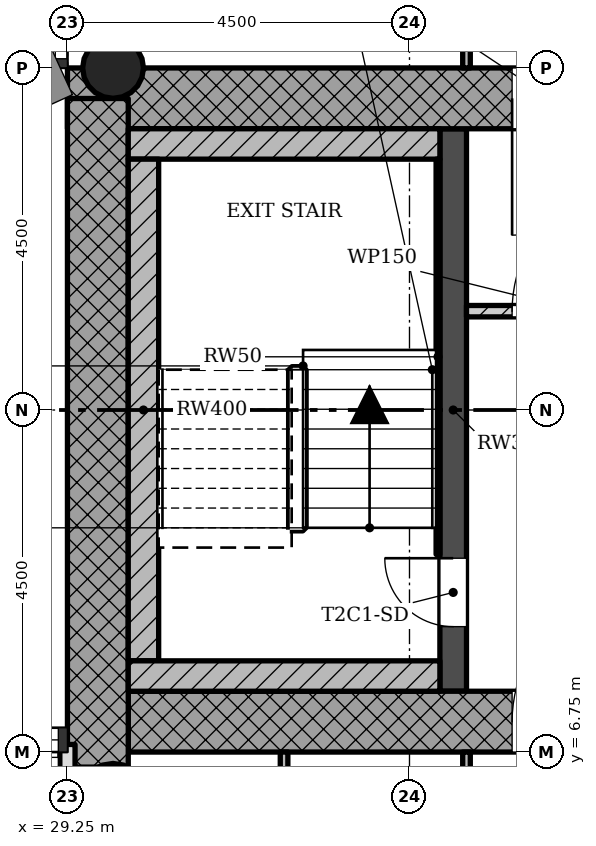
"""IFC4 building model, lengths in metres.
Left out: names, types, materials, properties, quantities, classifications, styles, units other than length and angle.
Written with IfcOpenShell. Run it as: python <this file> out.ifc"""

import sys

from ifc_helpers import new_model, si_unit, direction, frame, frame_2d, origin, origin_2d, place, context, subcontext, project, spatial, rectangle, hollow_circle, extrude, element, fill, save


model = new_model("IFC4")
c1 = context("Model", 3, precision=1e-05, world=origin(), true_north=direction((0.0, 1.0)))
c2 = subcontext(c1, "Body", "Model", "MODEL_VIEW")
j1 = project(units=[si_unit("LENGTHUNIT", "METRE"), si_unit("PLANEANGLEUNIT", "RADIAN")], contexts=[c1])
p1 = place(None, origin())
s1 = spatial("IfcSite", under=j1, at=p1, CompositionType="ELEMENT")
p2 = place(p1, origin())
s2 = spatial("IfcBuilding", under=s1, at=p2, CompositionType="ELEMENT")
p3 = place(p2, frame((0.0, 0.0, 157.5)))
s3 = spatial("IfcBuildingStorey", under=s2, at=p3, CompositionType="ELEMENT", Elevation=157.5)
p4 = place(p3, frame((30.05, 7.15, 0.0), z_axis=(0.0, 0.0, 1.0), x_axis=(1.0, 0.0, 0.0)))
e1 = element("IfcWall", 1, at=p4, inside=s3, PredefinedType="SHEAR", context=c2, shape_type="SweptSolid", body=[
    extrude(rectangle(XDim=12.7, YDim=0.8, at=frame_2d((6.35, 0.0))), origin(), (0.0, 0.0, 1.0), 3.4),
])
p5 = place(p4, frame((5.05, 0.0, 0.0)))
e2 = element("IfcOpeningElement", 2, at=p5, cuts=e1, PredefinedType="OPENING", context=c2, shape_type="SweptSolid", body=[
    extrude(rectangle(XDim=1.8, YDim=2.1, at=frame_2d((0.9, 1.05))), frame((0.0, 0.41, 0.0), z_axis=(0.0, -1.0, 0.0), x_axis=(1.0, 0.0, 0.0)), (0.0, 0.0, 1.0), 0.82),
])
p6 = place(p3, frame((41.95, 15.35, 0.0), z_axis=(0.0, 0.0, 1.0), x_axis=(-1.0, 0.0, 0.0)))
e3 = element("IfcWall", 3, at=p6, inside=s3, PredefinedType="SHEAR", context=c2, shape_type="SweptSolid", body=[
    extrude(rectangle(XDim=12.7, YDim=0.8, at=frame_2d((6.35, 0.0))), origin(), (0.0, 0.0, 1.0), 3.4),
])
p7 = place(p6, frame((5.05, 0.0, 0.0)))
e4 = element("IfcOpeningElement", 4, at=p7, cuts=e3, PredefinedType="OPENING", context=c2, shape_type="SweptSolid", body=[
    extrude(rectangle(XDim=1.8, YDim=2.1, at=frame_2d((0.9, 1.05))), frame((0.0, 0.41, 0.0), z_axis=(0.0, -1.0, 0.0), x_axis=(1.0, 0.0, 0.0)), (0.0, 0.0, 1.0), 0.82),
])
p8 = place(p3, frame((29.65, 15.348, 0.0), z_axis=(0.0, 0.0, 1.0), x_axis=(0.0, -1.0, 0.0)))
e5 = element("IfcWall", 5, at=p8, inside=s3, PredefinedType="SHEAR", context=c2, shape_type="SweptSolid", body=[
    extrude(rectangle(XDim=8.796, YDim=0.8, at=frame_2d((4.398, 0.0))), origin(), (0.0, 0.0, 1.0), 3.4),
])
p9 = place(p3, frame((34.325, 7.55, 0.0), z_axis=(0.0, 0.0, 1.0), x_axis=(0.0, 1.0, 0.0)))
e6 = element("IfcWall", 6, at=p9, inside=s3, PredefinedType="SHEAR", context=c2, shape_type="SweptSolid", body=[
    extrude(rectangle(XDim=7.4, YDim=0.35, at=frame_2d((3.7, 0.0))), origin(), (0.0, 0.0, 1.0), 3.4),
])
p10 = place(p9, frame((0.85, 0.0, 0.0)))
e7 = element("IfcOpeningElement", 7, at=p10, cuts=e6, PredefinedType="OPENING", context=c2, shape_type="SweptSolid", body=[
    extrude(rectangle(XDim=0.9, YDim=2.1, at=frame_2d((0.45, 1.05))), frame((0.0, 0.185, 0.0), z_axis=(0.0, -1.0, 0.0), x_axis=(1.0, 0.0, 0.0)), (0.0, 0.0, 1.0), 0.37),
])
p11 = place(p3, frame((29.85, 15.75, 0.0), z_axis=(0.0, 0.0, 1.0), x_axis=(1.0, 0.0, 0.0)))
e8 = element("IfcColumn", 8, at=p11, inside=s3, PredefinedType="COLUMN", context=c2, shape_type="SweptSolid", body=[
    extrude(hollow_circle(Radius=0.4, WallThickness=0.028, at=origin_2d()), origin(), (0.0, 0.0, 1.0), 3.4),
])
p12 = place(p3, frame((29.85, 6.15, 0.0), z_axis=(0.0, 0.0, 1.0), x_axis=(1.0, 0.0, 0.0)))
e9 = element("IfcColumn", 9, at=p12, inside=s3, PredefinedType="COLUMN", context=c2, shape_type="SweptSolid", body=[
    extrude(hollow_circle(Radius=0.45, WallThickness=0.032, at=origin_2d()), origin(), (0.0, 0.0, 1.0), 3.4),
])
p13 = place(p3, frame((37.5, 12.55, 0.0), z_axis=(0.0, 0.0, 1.0), x_axis=(-1.0, 0.0, 0.0)))
e10 = element("IfcWall", 10, at=p13, inside=s3, PredefinedType="PARTITIONING", context=c2, shape_type="SweptSolid", body=[
    extrude(rectangle(XDim=3.0, YDim=0.15, at=frame_2d((1.5, 0.0))), origin(), (0.0, 0.0, 1.0), 3.0),
])
p14 = place(p13, frame((0.6, 0.0, 0.0)))
e11 = element("IfcOpeningElement", 11, at=p14, cuts=e10, PredefinedType="OPENING", context=c2, shape_type="SweptSolid", body=[
    extrude(rectangle(XDim=1.8, YDim=2.1, at=frame_2d((0.9, 1.05))), frame((0.0, 0.085, 0.0), z_axis=(0.0, -1.0, 0.0), x_axis=(1.0, 0.0, 0.0)), (0.0, 0.0, 1.0), 0.17),
])
p15 = place(p3, frame((34.5, 4.5, 0.0), z_axis=(0.0, 0.0, 1.0), x_axis=(0.0, 1.0, 0.0)))
e12 = element("IfcWall", 12, at=p15, inside=s3, PredefinedType="PARTITIONING", context=c2, shape_type="SweptSolid", body=[
    extrude(rectangle(XDim=2.25, YDim=0.1, at=frame_2d((1.125, 0.0))), origin(), (0.0, 0.0, 1.0), 3.0),
])
p16 = place(p15, frame((0.675, 0.0, 0.0)))
e13 = element("IfcOpeningElement", 13, at=p16, cuts=e12, PredefinedType="OPENING", context=c2, shape_type="SweptSolid", body=[
    extrude(rectangle(XDim=0.9, YDim=2.1, at=frame_2d((0.45, 1.05))), frame((0.0, 0.06, 0.0), z_axis=(0.0, -1.0, 0.0), x_axis=(1.0, 0.0, 0.0)), (0.0, 0.0, 1.0), 0.12),
])
p17 = place(p3, frame((34.5, 15.75, 0.0), z_axis=(0.0, 0.0, 1.0), x_axis=(0.0, 1.0, 0.0)))
e14 = element("IfcWall", 14, at=p17, inside=s3, PredefinedType="PARTITIONING", context=c2, shape_type="SweptSolid", body=[
    extrude(rectangle(XDim=4.5, YDim=0.1, at=frame_2d((2.25, 0.0))), origin(), (0.0, 0.0, 1.0), 3.0),
])
p18 = place(p17, frame((1.8, 0.0, 0.0)))
e15 = element("IfcOpeningElement", 15, at=p18, cuts=e14, PredefinedType="OPENING", context=c2, shape_type="SweptSolid", body=[
    extrude(rectangle(XDim=0.9, YDim=2.1, at=frame_2d((0.45, 1.05))), frame((0.0, 0.06, 0.0), z_axis=(0.0, -1.0, 0.0), x_axis=(1.0, 0.0, 0.0)), (0.0, 0.0, 1.0), 0.12),
])
p19 = place(p3, frame((32.1, 4.5, 0.0), z_axis=(0.0, 0.0, 1.0), x_axis=(0.0, 1.0, 0.0)))
e16 = element("IfcWall", 16, at=p19, inside=s3, PredefinedType="PARTITIONING", context=c2, shape_type="SweptSolid", body=[
    extrude(rectangle(XDim=2.25, YDim=0.1, at=frame_2d((1.125, 0.0))), origin(), (0.0, 0.0, 1.0), 3.0),
])
p20 = place(p3, frame((29.25, -6.85, 0.0), z_axis=(0.0, 0.0, 1.0), x_axis=(0.0, 1.0, 0.0)))
e17 = element("IfcWall", 17, at=p20, inside=s3, PredefinedType="SOLIDWALL", context=c2, shape_type="SweptSolid", body=[
    extrude(rectangle(XDim=13.7, YDim=0.2, at=frame_2d((6.85, 0.0))), origin(), (0.0, 0.0, 1.0), 3.0),
])
p21 = place(p20, frame((6.4, 0.0, 0.0)))
e18 = element("IfcOpeningElement", 18, at=p21, cuts=e17, PredefinedType="OPENING", context=c2, shape_type="SweptSolid", body=[
    extrude(rectangle(XDim=0.9, YDim=2.1, at=frame_2d((0.45, 1.05))), frame((0.0, 0.11, 0.0), z_axis=(0.0, -1.0, 0.0), x_axis=(1.0, 0.0, 0.0)), (0.0, 0.0, 1.0), 0.22),
])
p22 = place(p3, frame((34.15, 14.75, 0.0), z_axis=(0.0, 0.0, 1.0), x_axis=(-1.0, 0.0, 0.0)))
e19 = element("IfcWall", 19, at=p22, inside=s3, PredefinedType="SHEAR", context=c2, shape_type="SweptSolid", body=[
    extrude(rectangle(XDim=4.1, YDim=0.4, at=frame_2d((2.05, 0.0))), origin(), (0.0, 0.0, 1.0), 3.4),
])
p23 = place(p3, frame((30.25, 7.95, 0.0), z_axis=(0.0, 0.0, 1.0), x_axis=(0.0, 1.0, 0.0)))
e20 = element("IfcWall", 20, at=p23, inside=s3, PredefinedType="SHEAR", context=c2, shape_type="SweptSolid", body=[
    extrude(rectangle(XDim=6.6, YDim=0.4, at=frame_2d((3.3, 0.0))), origin(), (0.0, 0.0, 1.0), 3.4),
])
p24 = place(p3, frame((34.15, 7.75, 0.0), z_axis=(0.0, 0.0, 1.0), x_axis=(-1.0, 0.0, 0.0)))
e21 = element("IfcWall", 21, at=p24, inside=s3, PredefinedType="SHEAR", context=c2, shape_type="SweptSolid", body=[
    extrude(rectangle(XDim=4.1, YDim=0.4, at=frame_2d((2.05, 0.0))), origin(), (0.0, 0.0, 1.0), 3.4),
])
p25 = place(p3, frame((34.125, 9.35, 0.0), z_axis=(0.0, 0.0, 1.0), x_axis=(0.0, 1.0, 0.0)))
e22 = element("IfcWall", 22, at=p25, inside=s3, PredefinedType="SHEAR", context=c2, shape_type="SweptSolid", body=[
    extrude(rectangle(XDim=5.2, YDim=0.05, at=frame_2d((2.6, 0.0))), origin(), (0.0, 0.0, 1.0), 3.4),
])
p26 = place(p14, origin())
e23 = element("IfcDoor", 23, at=p26, inside=s3, OperationType="SINGLE_SWING_LEFT", PredefinedType="DOOR", context=c2, shape_type="SweptSolid", body=[
    extrude(rectangle(XDim=1.8, YDim=2.1, at=frame_2d((0.9, 1.05))), frame((0.0, 0.025, 0.0), z_axis=(0.0, -1.0, 0.0), x_axis=(1.0, 0.0, 0.0)), (0.0, 0.0, 1.0), 0.05),
])
fill(e11, e23)
p27 = place(p10, origin())
e24 = element("IfcDoor", 24, at=p27, inside=s3, OperationType="SINGLE_SWING_LEFT", PredefinedType="DOOR", context=c2, shape_type="SweptSolid", body=[
    extrude(rectangle(XDim=0.9, YDim=2.1, at=frame_2d((0.45, 1.05))), frame((0.0, 0.025, 0.0), z_axis=(0.0, -1.0, 0.0), x_axis=(1.0, 0.0, 0.0)), (0.0, 0.0, 1.0), 0.05),
])
fill(e7, e24)
p28 = place(p5, origin())
e25 = element("IfcDoor", 25, at=p28, inside=s3, OperationType="SINGLE_SWING_LEFT", PredefinedType="DOOR", context=c2, shape_type="SweptSolid", body=[
    extrude(rectangle(XDim=1.8, YDim=2.1, at=frame_2d((0.9, 1.05))), frame((0.0, 0.025, 0.0), z_axis=(0.0, -1.0, 0.0), x_axis=(1.0, 0.0, 0.0)), (0.0, 0.0, 1.0), 0.05),
])
fill(e2, e25)
p29 = place(p7, origin())
e26 = element("IfcDoor", 26, at=p29, inside=s3, OperationType="SINGLE_SWING_LEFT", PredefinedType="DOOR", context=c2, shape_type="SweptSolid", body=[
    extrude(rectangle(XDim=1.8, YDim=2.1, at=frame_2d((0.9, 1.05))), frame((0.0, 0.025, 0.0), z_axis=(0.0, -1.0, 0.0), x_axis=(1.0, 0.0, 0.0)), (0.0, 0.0, 1.0), 0.05),
])
fill(e4, e26)
save(model, sys.argv[1])
